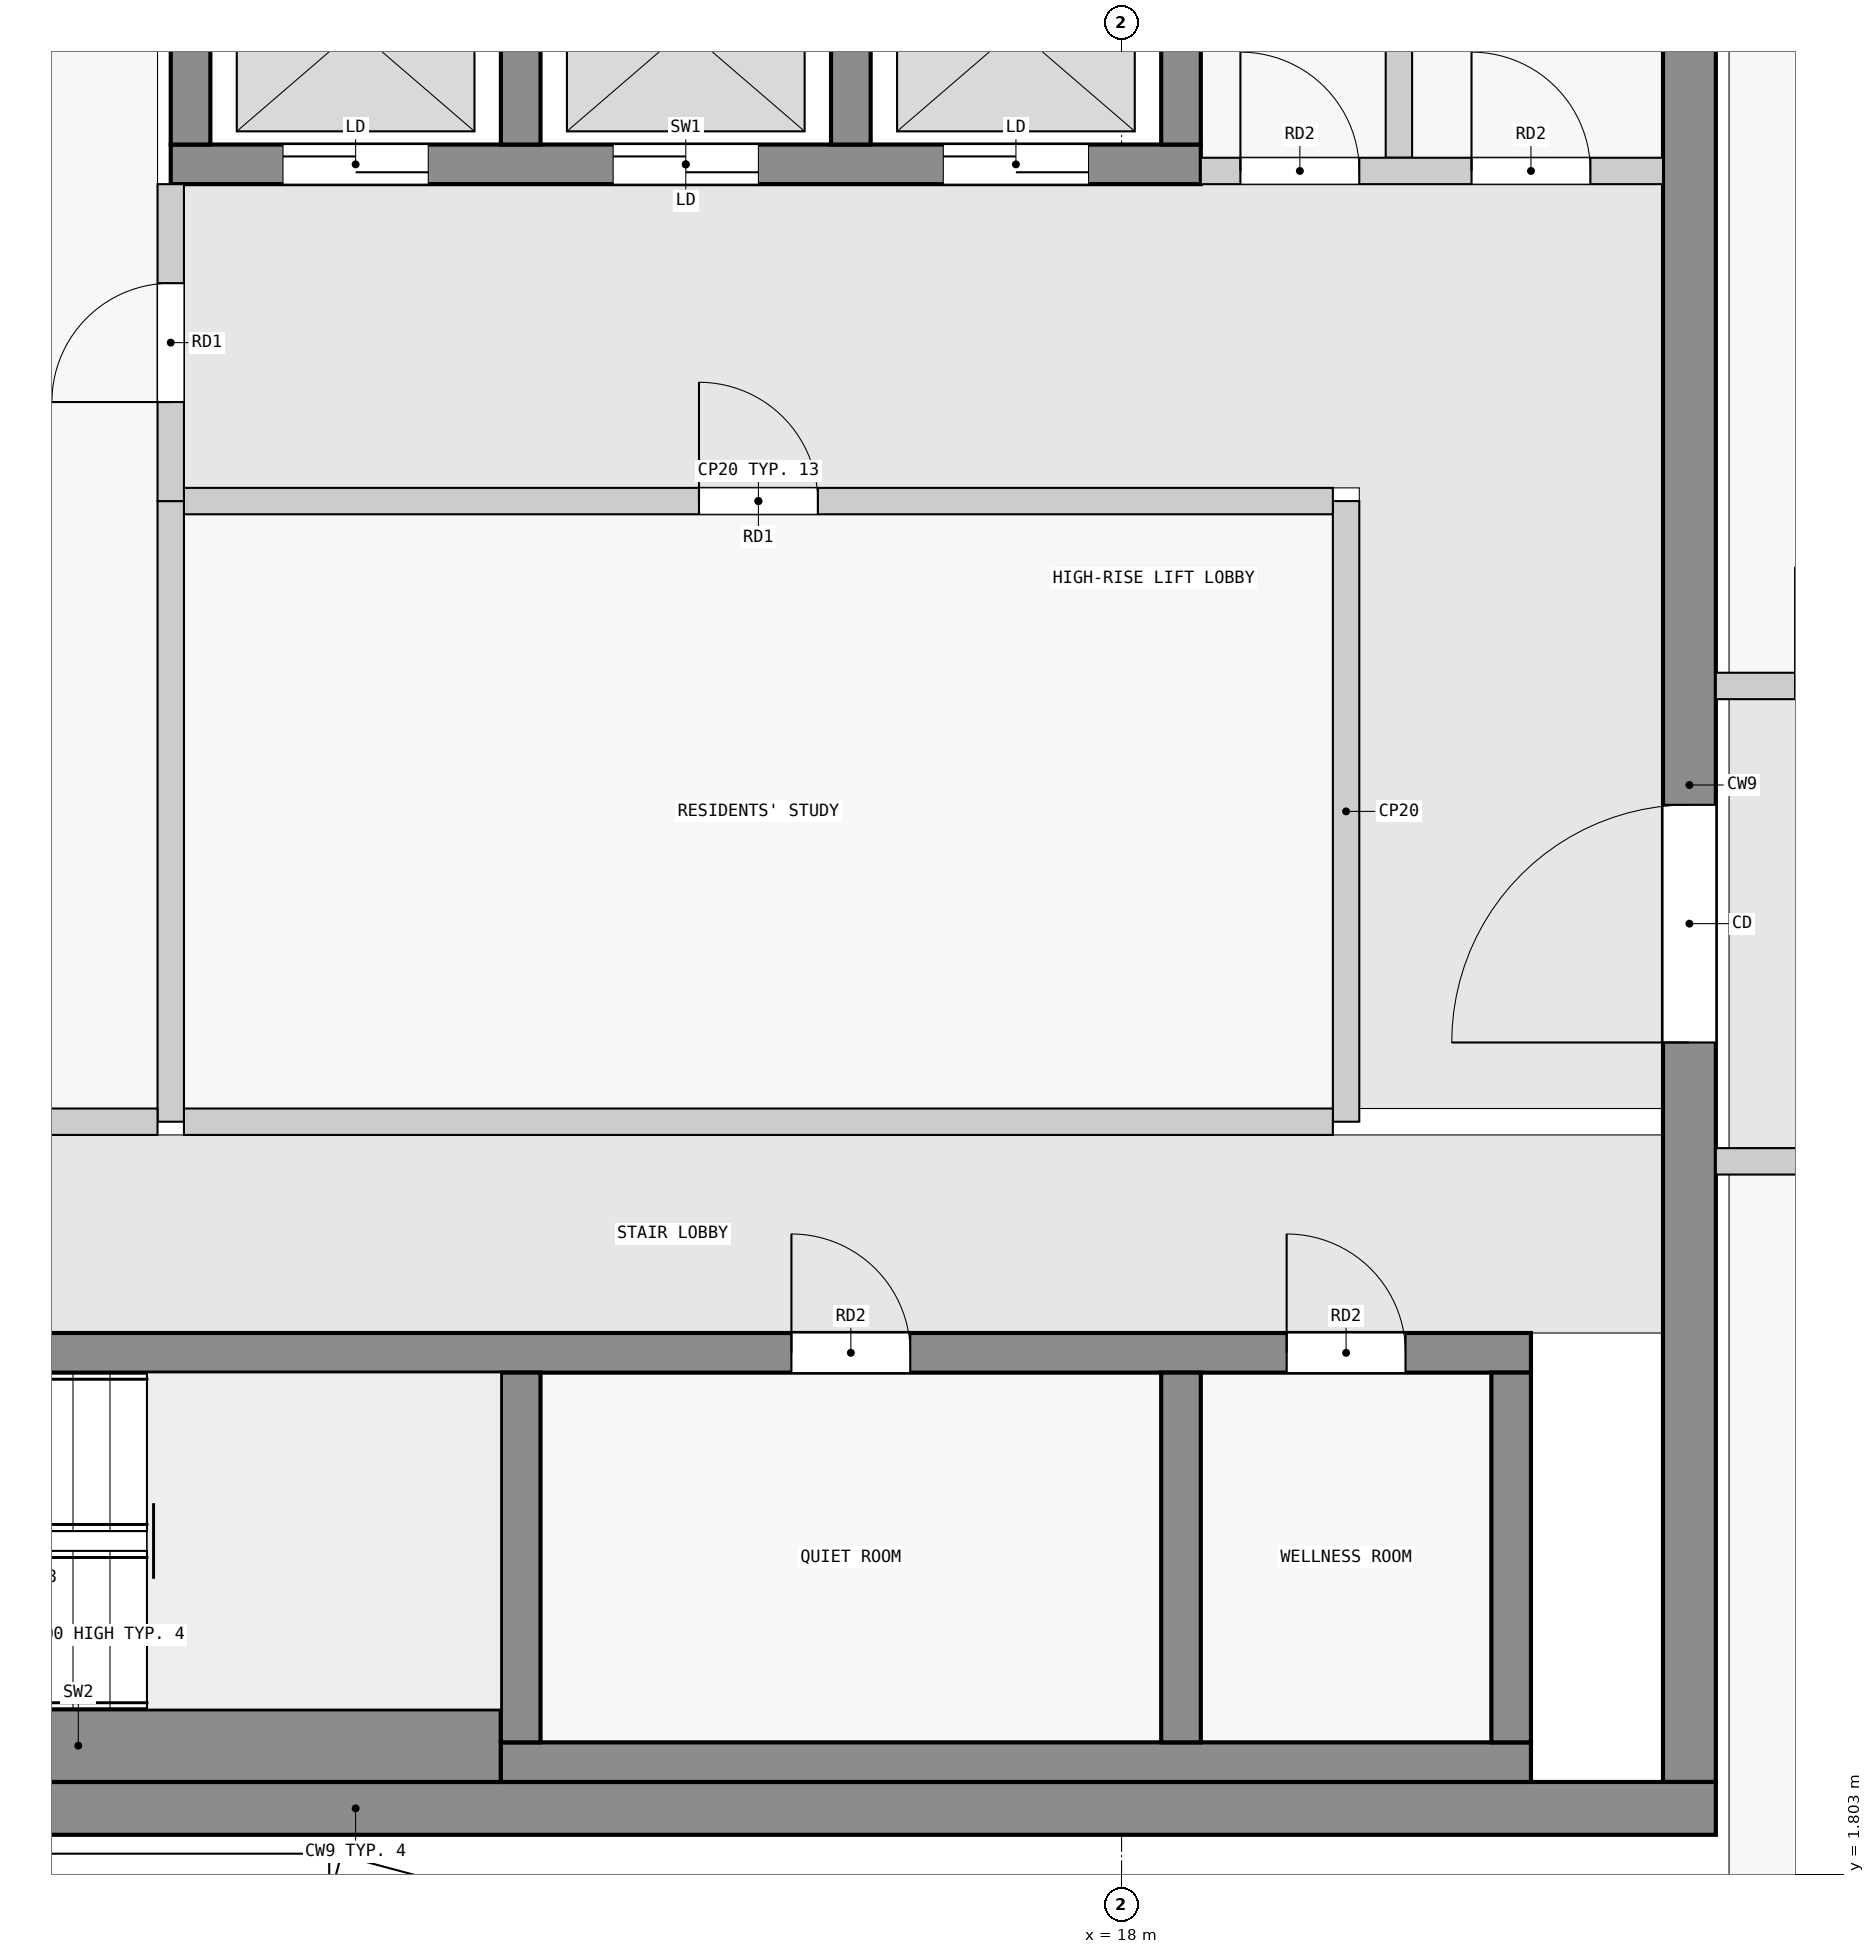
"""IFC4 building model, lengths in metres.
Left out: names, types, materials, properties, quantities, classifications, styles, units other than length and angle.
Written with IfcOpenShell. Run it as: python <this file> out.ifc"""

import sys

from ifc_helpers import new_model, si_unit, direction, frame, frame_2d, origin, place, context, subcontext, project, spatial, rectangle, extrude, element, fill, save


model = new_model("IFC4")
c1 = context("Model", 3, precision=1e-05, world=origin(), true_north=direction((0.0, 1.0)))
c2 = subcontext(c1, "Body", "Model", "MODEL_VIEW")
j1 = project(units=[si_unit("LENGTHUNIT", "METRE"), si_unit("PLANEANGLEUNIT", "RADIAN")], contexts=[c1])
p1 = place(None, origin())
s1 = spatial("IfcSite", under=j1, at=p1, CompositionType="ELEMENT")
p2 = place(p1, origin())
s2 = spatial("IfcBuilding", under=s1, at=p2, CompositionType="ELEMENT")
p3 = place(p2, frame((0.0, 0.0, 301.9)))
s3 = spatial("IfcBuildingStorey", under=s2, at=p3, CompositionType="ELEMENT", Elevation=301.9)
p4 = place(p3, frame((1.9, 2.3, 0.0), z_axis=(0.0, 0.0, 1.0), x_axis=(1.0, 0.0, 0.0)))
e1 = element("IfcWall", 1, at=p4, inside=s3, PredefinedType="SHEAR", context=c2, shape_type="SweptSolid", body=[
    extrude(rectangle(XDim=20.6, YDim=0.4, at=frame_2d((10.3, 0.0))), origin(), (0.0, 0.0, 1.0), 3.25),
])
p5 = place(p3, frame((22.3, 2.5, 0.0), z_axis=(0.0, 0.0, 1.0), x_axis=(0.0, 1.0, 0.0)))
e2 = element("IfcWall", 2, at=p5, inside=s3, PredefinedType="SHEAR", context=c2, shape_type="SweptSolid", body=[
    extrude(rectangle(XDim=15.1, YDim=0.4, at=frame_2d((7.55, 0.0))), origin(), (0.0, 0.0, 1.0), 3.25),
])
p6 = place(p5, frame((5.6, 0.0, 0.0)))
e3 = element("IfcOpeningElement", 3, at=p6, cuts=e2, PredefinedType="OPENING", context=c2, shape_type="SweptSolid", body=[
    extrude(rectangle(XDim=1.8, YDim=2.1, at=frame_2d((0.9, 1.05))), frame((0.0, 0.21, 0.0), z_axis=(0.0, -1.0, 0.0), x_axis=(1.0, 0.0, 0.0)), (0.0, 0.0, 1.0), 0.42),
])
p7 = place(p3, frame((6.9, 2.775, 0.0), z_axis=(0.0, 0.0, 1.0), x_axis=(1.0, 0.0, 0.0)))
e4 = element("IfcWall", 4, at=p7, inside=s3, PredefinedType="SHEAR", context=c2, shape_type="SweptSolid", body=[
    extrude(rectangle(XDim=6.4, YDim=0.55, at=frame_2d((3.2, 0.0))), origin(), (0.0, 0.0, 1.0), 3.25),
])
p8 = place(p3, frame((13.3, 2.65, 0.0), z_axis=(0.0, 0.0, 1.0), x_axis=(1.0, 0.0, 0.0)))
e5 = element("IfcWall", 5, at=p8, inside=s3, PredefinedType="SHEAR", context=c2, shape_type="SweptSolid", body=[
    extrude(rectangle(XDim=7.8, YDim=0.3, at=frame_2d((3.9, 0.0))), origin(), (0.0, 0.0, 1.0), 3.25),
])
for number, where, z_axis, x_axis in (
    (6, (13.45, 2.8, 0.0), (0.0, 0.0, 1.0), (0.0, 1.0, 0.0)),
    (7, (18.45, 2.8, 0.0), (0.0, 0.0, 1.0), (0.0, 1.0, 0.0)),
    (8, (20.95, 2.8, 0.0), (0.0, 0.0, 1.0), (0.0, 1.0, 0.0)),
):
    element("IfcWall", number, at=place(p3, frame(where, z_axis=z_axis, x_axis=x_axis)), inside=s3, PredefinedType="SHEAR", context=c2, shape_type="SweptSolid", body=[
        extrude(rectangle(XDim=2.8, YDim=0.3, at=frame_2d((1.4, 0.0))), origin(), (0.0, 0.0, 1.0), 3.25),
    ])
p9 = place(p3, frame((2.3, 5.75, 0.0), z_axis=(0.0, 0.0, 1.0), x_axis=(1.0, 0.0, 0.0)))
e9 = element("IfcWall", 9, at=p9, inside=s3, PredefinedType="SHEAR", context=c2, shape_type="SweptSolid", body=[
    extrude(rectangle(XDim=18.8, YDim=0.3, at=frame_2d((9.4, 0.0))), origin(), (0.0, 0.0, 1.0), 3.25),
])
p10 = place(p9, frame((4.65, 0.0, 0.0)))
e10 = element("IfcOpeningElement", 10, at=p10, cuts=e9, PredefinedType="OPENING", context=c2, shape_type="SweptSolid", body=[
    extrude(rectangle(XDim=1.1, YDim=2.1, at=frame_2d((0.55, 1.05))), frame((0.0, 0.16, 0.0), z_axis=(0.0, -1.0, 0.0), x_axis=(1.0, 0.0, 0.0)), (0.0, 0.0, 1.0), 0.32),
])
p11 = place(p9, frame((0.45, 0.0, 0.0)))
e11 = element("IfcOpeningElement", 11, at=p11, cuts=e9, PredefinedType="OPENING", context=c2, shape_type="SweptSolid", body=[
    extrude(rectangle(XDim=1.1, YDim=2.1, at=frame_2d((0.55, 1.05))), frame((0.0, 0.16, 0.0), z_axis=(0.0, -1.0, 0.0), x_axis=(1.0, 0.0, 0.0)), (0.0, 0.0, 1.0), 0.32),
])
p12 = place(p9, frame((2.75, 0.0, 0.0)))
e12 = element("IfcOpeningElement", 12, at=p12, cuts=e9, PredefinedType="OPENING", context=c2, shape_type="SweptSolid", body=[
    extrude(rectangle(XDim=1.1, YDim=2.1, at=frame_2d((0.55, 1.05))), frame((0.0, 0.16, 0.0), z_axis=(0.0, -1.0, 0.0), x_axis=(1.0, 0.0, 0.0)), (0.0, 0.0, 1.0), 0.32),
])
p13 = place(p9, frame((13.2, 0.0, 0.0)))
e13 = element("IfcOpeningElement", 13, at=p13, cuts=e9, PredefinedType="OPENING", context=c2, shape_type="SweptSolid", body=[
    extrude(rectangle(XDim=0.9, YDim=2.1, at=frame_2d((0.45, 1.05))), frame((0.0, 0.16, 0.0), z_axis=(0.0, -1.0, 0.0), x_axis=(1.0, 0.0, 0.0)), (0.0, 0.0, 1.0), 0.32),
])
p14 = place(p9, frame((16.95, 0.0, 0.0)))
e14 = element("IfcOpeningElement", 14, at=p14, cuts=e9, PredefinedType="OPENING", context=c2, shape_type="SweptSolid", body=[
    extrude(rectangle(XDim=0.9, YDim=2.1, at=frame_2d((0.45, 1.05))), frame((0.0, 0.16, 0.0), z_axis=(0.0, -1.0, 0.0), x_axis=(1.0, 0.0, 0.0)), (0.0, 0.0, 1.0), 0.32),
])
p15 = place(p3, frame((10.8, 14.75, 0.0), z_axis=(0.0, 0.0, 1.0), x_axis=(1.0, 0.0, 0.0)))
e15 = element("IfcWall", 15, at=p15, inside=s3, PredefinedType="SHEAR", context=c2, shape_type="SweptSolid", body=[
    extrude(rectangle(XDim=7.8, YDim=0.3, at=frame_2d((3.9, 0.0))), origin(), (0.0, 0.0, 1.0), 3.25),
])
p16 = place(p15, frame((0.85, 0.0, 0.0)))
e16 = element("IfcOpeningElement", 16, at=p16, cuts=e15, PredefinedType="OPENING", context=c2, shape_type="SweptSolid", body=[
    extrude(rectangle(XDim=1.1, YDim=2.1, at=frame_2d((0.55, 1.05))), frame((0.0, 0.16, 0.0), z_axis=(0.0, -1.0, 0.0), x_axis=(1.0, 0.0, 0.0)), (0.0, 0.0, 1.0), 0.32),
])
p17 = place(p15, frame((3.35, 0.0, 0.0)))
e17 = element("IfcOpeningElement", 17, at=p17, cuts=e15, PredefinedType="OPENING", context=c2, shape_type="SweptSolid", body=[
    extrude(rectangle(XDim=1.1, YDim=2.1, at=frame_2d((0.55, 1.05))), frame((0.0, 0.16, 0.0), z_axis=(0.0, -1.0, 0.0), x_axis=(1.0, 0.0, 0.0)), (0.0, 0.0, 1.0), 0.32),
])
p18 = place(p15, frame((5.85, 0.0, 0.0)))
e18 = element("IfcOpeningElement", 18, at=p18, cuts=e15, PredefinedType="OPENING", context=c2, shape_type="SweptSolid", body=[
    extrude(rectangle(XDim=1.1, YDim=2.1, at=frame_2d((0.55, 1.05))), frame((0.0, 0.16, 0.0), z_axis=(0.0, -1.0, 0.0), x_axis=(1.0, 0.0, 0.0)), (0.0, 0.0, 1.0), 0.32),
])
for number, where, z_axis, x_axis in (
    (19, (10.95, 14.9, 0.0), (0.0, 0.0, 1.0), (0.0, 1.0, 0.0)),
    (20, (13.45, 14.9, 0.0), (0.0, 0.0, 1.0), (0.0, 1.0, 0.0)),
    (21, (15.95, 14.9, 0.0), (0.0, 0.0, 1.0), (0.0, 1.0, 0.0)),
    (22, (18.45, 14.9, 0.0), (0.0, 0.0, 1.0), (0.0, 1.0, 0.0)),
):
    element("IfcWall", number, at=place(p3, frame(where, z_axis=z_axis, x_axis=x_axis)), inside=s3, PredefinedType="SHEAR", context=c2, shape_type="SweptSolid", body=[
        extrude(rectangle(XDim=2.0, YDim=0.3, at=frame_2d((1.0, 0.0))), origin(), (0.0, 0.0, 1.0), 3.25),
    ])
p19 = place(p3, frame((7.1, 7.5, 0.0), z_axis=(0.0, 0.0, 1.0), x_axis=(1.0, 0.0, 0.0)))
e23 = element("IfcWall", 23, at=p19, inside=s3, PredefinedType="PARTITIONING", context=c2, shape_type="SweptSolid", body=[
    extrude(rectangle(XDim=3.6, YDim=0.2, at=frame_2d((1.8, 0.0))), origin(), (0.0, 0.0, 1.0), 3.25),
])
p20 = place(p3, frame((10.8, 12.2, 0.0), z_axis=(0.0, 0.0, 1.0), x_axis=(0.0, 1.0, 0.0)))
e24 = element("IfcWall", 24, at=p20, inside=s3, PredefinedType="PARTITIONING", context=c2, shape_type="SweptSolid", body=[
    extrude(rectangle(XDim=2.4, YDim=0.2, at=frame_2d((1.2, 0.0))), origin(), (0.0, 0.0, 1.0), 3.25),
])
p21 = place(p20, frame((0.75, 0.0, 0.0)))
e25 = element("IfcOpeningElement", 25, at=p21, cuts=e24, PredefinedType="OPENING", context=c2, shape_type="SweptSolid", body=[
    extrude(rectangle(XDim=0.9, YDim=2.1, at=frame_2d((0.45, 1.05))), frame((0.0, 0.11, 0.0), z_axis=(0.0, -1.0, 0.0), x_axis=(1.0, 0.0, 0.0)), (0.0, 0.0, 1.0), 0.22),
])
p22 = place(p3, frame((10.8, 7.5, 0.0), z_axis=(0.0, 0.0, 1.0), x_axis=(0.0, 1.0, 0.0)))
e26 = element("IfcWall", 26, at=p22, inside=s3, PredefinedType="PARTITIONING", context=c2, shape_type="SweptSolid", body=[
    extrude(rectangle(XDim=4.7, YDim=0.2, at=frame_2d((2.35, 0.0))), origin(), (0.0, 0.0, 1.0), 3.25),
])
p23 = place(p3, frame((10.9, 7.5, 0.0), z_axis=(0.0, 0.0, 1.0), x_axis=(1.0, 0.0, 0.0)))
e27 = element("IfcWall", 27, at=p23, inside=s3, PredefinedType="PARTITIONING", context=c2, shape_type="SweptSolid", body=[
    extrude(rectangle(XDim=8.7, YDim=0.2, at=frame_2d((4.35, 0.0))), origin(), (0.0, 0.0, 1.0), 3.25),
])
p24 = place(p3, frame((19.7, 7.5, 0.0), z_axis=(0.0, 0.0, 1.0), x_axis=(0.0, 1.0, 0.0)))
e28 = element("IfcWall", 28, at=p24, inside=s3, PredefinedType="PARTITIONING", context=c2, shape_type="SweptSolid", body=[
    extrude(rectangle(XDim=4.7, YDim=0.2, at=frame_2d((2.35, 0.0))), origin(), (0.0, 0.0, 1.0), 3.25),
])
p25 = place(p3, frame((10.9, 12.2, 0.0), z_axis=(0.0, 0.0, 1.0), x_axis=(1.0, 0.0, 0.0)))
e29 = element("IfcWall", 29, at=p25, inside=s3, PredefinedType="PARTITIONING", context=c2, shape_type="SweptSolid", body=[
    extrude(rectangle(XDim=8.7, YDim=0.2, at=frame_2d((4.35, 0.0))), origin(), (0.0, 0.0, 1.0), 3.25),
])
p26 = place(p25, frame((3.9, 0.0, 0.0)))
e30 = element("IfcOpeningElement", 30, at=p26, cuts=e29, PredefinedType="OPENING", context=c2, shape_type="SweptSolid", body=[
    extrude(rectangle(XDim=0.9, YDim=2.1, at=frame_2d((0.45, 1.05))), frame((0.0, 0.11, 0.0), z_axis=(0.0, -1.0, 0.0), x_axis=(1.0, 0.0, 0.0)), (0.0, 0.0, 1.0), 0.22),
])
p27 = place(p3, frame((18.6, 14.7, 0.0), z_axis=(0.0, 0.0, 1.0), x_axis=(1.0, 0.0, 0.0)))
e31 = element("IfcWall", 31, at=p27, inside=s3, PredefinedType="PARTITIONING", context=c2, shape_type="SweptSolid", body=[
    extrude(rectangle(XDim=3.5, YDim=0.2, at=frame_2d((1.75, 0.0))), origin(), (0.0, 0.0, 1.0), 3.25),
])
p28 = place(p27, frame((0.3, 0.0, 0.0)))
e32 = element("IfcOpeningElement", 32, at=p28, cuts=e31, PredefinedType="OPENING", context=c2, shape_type="SweptSolid", body=[
    extrude(rectangle(XDim=0.9, YDim=2.1, at=frame_2d((0.45, 1.05))), frame((0.0, 0.11, 0.0), z_axis=(0.0, -1.0, 0.0), x_axis=(1.0, 0.0, 0.0)), (0.0, 0.0, 1.0), 0.22),
])
p29 = place(p27, frame((2.05, 0.0, 0.0)))
e33 = element("IfcOpeningElement", 33, at=p29, cuts=e31, PredefinedType="OPENING", context=c2, shape_type="SweptSolid", body=[
    extrude(rectangle(XDim=0.9, YDim=2.1, at=frame_2d((0.45, 1.05))), frame((0.0, 0.11, 0.0), z_axis=(0.0, -1.0, 0.0), x_axis=(1.0, 0.0, 0.0)), (0.0, 0.0, 1.0), 0.22),
])
p30 = place(p3, frame((20.1, 14.8, 0.0), z_axis=(0.0, 0.0, 1.0), x_axis=(0.0, 1.0, 0.0)))
e34 = element("IfcWall", 34, at=p30, inside=s3, PredefinedType="PARTITIONING", context=c2, shape_type="SweptSolid", body=[
    extrude(rectangle(XDim=2.8, YDim=0.2, at=frame_2d((1.4, 0.0))), origin(), (0.0, 0.0, 1.0), 3.25),
])
p31 = place(p3, frame((27.0, 7.2, 0.0), z_axis=(0.0, 0.0, 1.0), x_axis=(-1.0, 0.0, 0.0)))
e35 = element("IfcWall", 35, at=p31, inside=s3, PredefinedType="PARTITIONING", context=c2, shape_type="SweptSolid", body=[
    extrude(rectangle(XDim=4.5, YDim=0.2, at=frame_2d((2.25, 0.0))), origin(), (0.0, 0.0, 1.0), 2.642),
])
p32 = place(p31, frame((1.35, 0.0, 0.0)))
e36 = element("IfcOpeningElement", 36, at=p32, cuts=e35, PredefinedType="OPENING", context=c2, shape_type="SweptSolid", body=[
    extrude(rectangle(XDim=1.8, YDim=2.1, at=frame_2d((0.9, 1.05))), frame((0.0, 0.11, 0.0), z_axis=(0.0, -1.0, 0.0), x_axis=(1.0, 0.0, 0.0)), (0.0, 0.0, 1.0), 0.22),
])
p33 = place(p3, frame((22.5, 10.8, 0.0), z_axis=(0.0, 0.0, 1.0), x_axis=(1.0, 0.0, 0.0)))
e37 = element("IfcWall", 37, at=p33, inside=s3, PredefinedType="PARTITIONING", context=c2, shape_type="SweptSolid", body=[
    extrude(rectangle(XDim=2.25, YDim=0.2, at=frame_2d((1.125, 0.0))), origin(), (0.0, 0.0, 1.0), 3.25),
])
p34 = place(p33, frame((0.6, 0.0, 0.0)))
e38 = element("IfcOpeningElement", 38, at=p34, cuts=e37, PredefinedType="OPENING", context=c2, shape_type="SweptSolid", body=[
    extrude(rectangle(XDim=0.9, YDim=2.1, at=frame_2d((0.45, 1.05))), frame((0.0, 0.11, 0.0), z_axis=(0.0, -1.0, 0.0), x_axis=(1.0, 0.0, 0.0)), (0.0, 0.0, 1.0), 0.22),
])
p35 = place(p21, origin())
e39 = element("IfcDoor", 39, at=p35, inside=s3, OperationType="SINGLE_SWING_LEFT", PredefinedType="DOOR", context=c2, shape_type="SweptSolid", body=[
    extrude(rectangle(XDim=0.9, YDim=2.1, at=frame_2d((0.45, 1.05))), frame((0.0, 0.025, 0.0), z_axis=(0.0, -1.0, 0.0), x_axis=(1.0, 0.0, 0.0)), (0.0, 0.0, 1.0), 0.05),
])
fill(e25, e39)
p36 = place(p26, origin())
e40 = element("IfcDoor", 40, at=p36, inside=s3, OperationType="SINGLE_SWING_LEFT", PredefinedType="DOOR", context=c2, shape_type="SweptSolid", body=[
    extrude(rectangle(XDim=0.9, YDim=2.1, at=frame_2d((0.45, 1.05))), frame((0.0, 0.025, 0.0), z_axis=(0.0, -1.0, 0.0), x_axis=(1.0, 0.0, 0.0)), (0.0, 0.0, 1.0), 0.05),
])
fill(e30, e40)
p37 = place(p16, origin())
e41 = element("IfcDoor", 41, at=p37, inside=s3, OperationType="DOUBLE_DOOR_SLIDING", PredefinedType="DOOR", context=c2, shape_type="SweptSolid", body=[
    extrude(rectangle(XDim=1.1, YDim=2.1, at=frame_2d((0.55, 1.05))), frame((0.0, 0.025, 0.0), z_axis=(0.0, -1.0, 0.0), x_axis=(1.0, 0.0, 0.0)), (0.0, 0.0, 1.0), 0.05),
])
fill(e16, e41)
p38 = place(p17, origin())
e42 = element("IfcDoor", 42, at=p38, inside=s3, OperationType="DOUBLE_DOOR_SLIDING", PredefinedType="DOOR", context=c2, shape_type="SweptSolid", body=[
    extrude(rectangle(XDim=1.1, YDim=2.1, at=frame_2d((0.55, 1.05))), frame((0.0, 0.025, 0.0), z_axis=(0.0, -1.0, 0.0), x_axis=(1.0, 0.0, 0.0)), (0.0, 0.0, 1.0), 0.05),
])
fill(e17, e42)
p39 = place(p18, origin())
e43 = element("IfcDoor", 43, at=p39, inside=s3, OperationType="DOUBLE_DOOR_SLIDING", PredefinedType="DOOR", context=c2, shape_type="SweptSolid", body=[
    extrude(rectangle(XDim=1.1, YDim=2.1, at=frame_2d((0.55, 1.05))), frame((0.0, 0.025, 0.0), z_axis=(0.0, -1.0, 0.0), x_axis=(1.0, 0.0, 0.0)), (0.0, 0.0, 1.0), 0.05),
])
fill(e18, e43)
p40 = place(p6, origin())
e44 = element("IfcDoor", 44, at=p40, inside=s3, OperationType="DOUBLE_DOOR_SINGLE_SWING", PredefinedType="DOOR", context=c2, shape_type="SweptSolid", body=[
    extrude(rectangle(XDim=1.8, YDim=2.1, at=frame_2d((0.9, 1.05))), frame((0.0, 0.025, 0.0), z_axis=(0.0, -1.0, 0.0), x_axis=(1.0, 0.0, 0.0)), (0.0, 0.0, 1.0), 0.05),
])
fill(e3, e44)
p41 = place(p28, origin())
e45 = element("IfcDoor", 45, at=p41, inside=s3, OperationType="SINGLE_SWING_LEFT", PredefinedType="DOOR", context=c2, shape_type="SweptSolid", body=[
    extrude(rectangle(XDim=0.9, YDim=2.1, at=frame_2d((0.45, 1.05))), frame((0.0, 0.025, 0.0), z_axis=(0.0, -1.0, 0.0), x_axis=(1.0, 0.0, 0.0)), (0.0, 0.0, 1.0), 0.05),
])
fill(e32, e45)
p42 = place(p29, origin())
e46 = element("IfcDoor", 46, at=p42, inside=s3, OperationType="SINGLE_SWING_LEFT", PredefinedType="DOOR", context=c2, shape_type="SweptSolid", body=[
    extrude(rectangle(XDim=0.9, YDim=2.1, at=frame_2d((0.45, 1.05))), frame((0.0, 0.025, 0.0), z_axis=(0.0, -1.0, 0.0), x_axis=(1.0, 0.0, 0.0)), (0.0, 0.0, 1.0), 0.05),
])
fill(e33, e46)
p43 = place(p13, origin())
e47 = element("IfcDoor", 47, at=p43, inside=s3, OperationType="SINGLE_SWING_LEFT", PredefinedType="DOOR", context=c2, shape_type="SweptSolid", body=[
    extrude(rectangle(XDim=0.9, YDim=2.1, at=frame_2d((0.45, 1.05))), frame((0.0, 0.025, 0.0), z_axis=(0.0, -1.0, 0.0), x_axis=(1.0, 0.0, 0.0)), (0.0, 0.0, 1.0), 0.05),
])
fill(e13, e47)
p44 = place(p14, origin())
e48 = element("IfcDoor", 48, at=p44, inside=s3, OperationType="SINGLE_SWING_LEFT", PredefinedType="DOOR", context=c2, shape_type="SweptSolid", body=[
    extrude(rectangle(XDim=0.9, YDim=2.1, at=frame_2d((0.45, 1.05))), frame((0.0, 0.025, 0.0), z_axis=(0.0, -1.0, 0.0), x_axis=(1.0, 0.0, 0.0)), (0.0, 0.0, 1.0), 0.05),
])
fill(e14, e48)
save(model, sys.argv[1])
